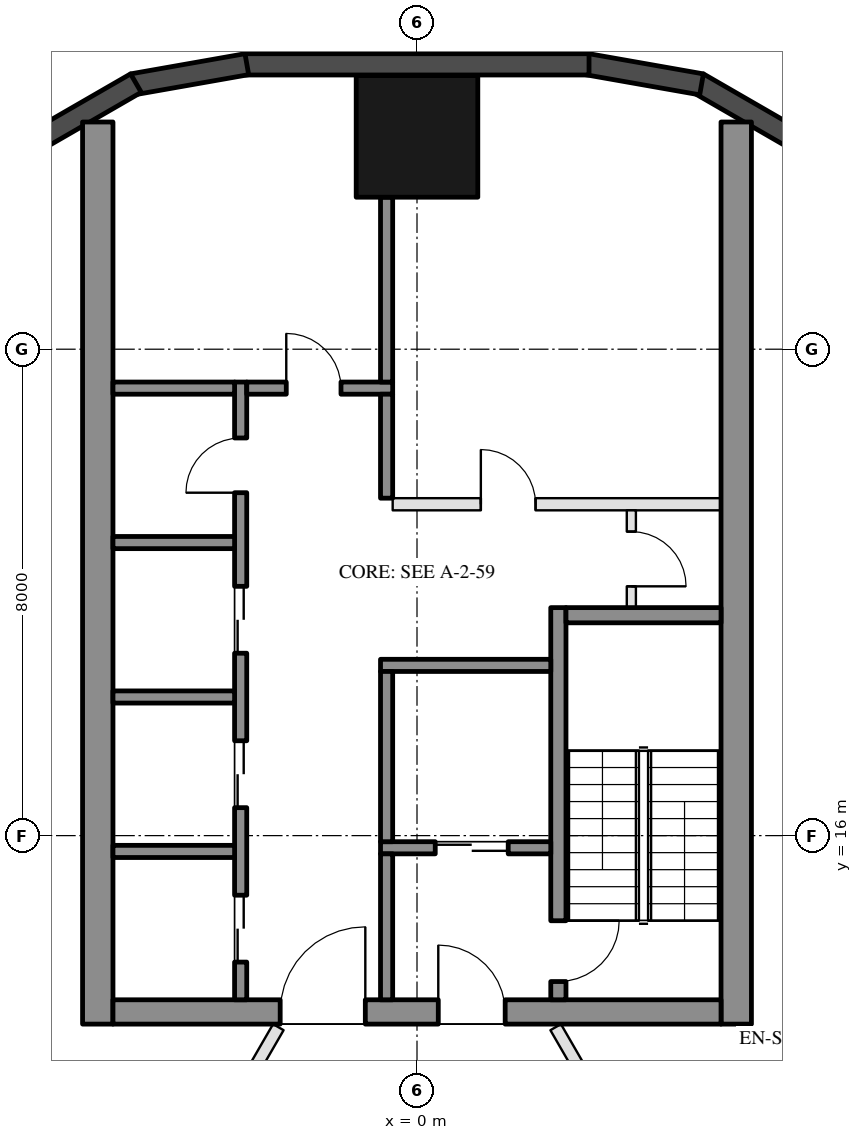
"""IFC4 building model, lengths in metres.
Left out: names, types, materials, properties, quantities, classifications, styles, units other than length and angle.
Written with IfcOpenShell. Run it as: python <this file> out.ifc"""

import sys

from ifc_helpers import new_model, si_unit, direction, frame, frame_2d, origin, origin_2d, place, context, subcontext, project, spatial, rectangle, hollow_rectangle, extrude, boolean, halfspace, element, fill, save


model = new_model("IFC4")
c1 = context("Model", 3, precision=1e-05, world=origin(), true_north=direction((0.0, 1.0)))
c2 = subcontext(c1, "Body", "Model", "MODEL_VIEW")
j1 = project(units=[si_unit("LENGTHUNIT", "METRE"), si_unit("PLANEANGLEUNIT", "RADIAN")], contexts=[c1])
p1 = place(None, origin())
s1 = spatial("IfcSite", under=j1, at=p1, CompositionType="ELEMENT")
p2 = place(p1, origin())
s2 = spatial("IfcBuilding", under=s1, at=p2, CompositionType="ELEMENT")
p3 = place(p2, frame((0.0, 0.0, 254.1)))
s3 = spatial("IfcBuildingStorey", under=s2, at=p3, CompositionType="ELEMENT", Elevation=254.1)
p4 = place(p3, frame((0.0, 27.5, 0.0), z_axis=(0.0, -0.217312342332, 0.976102118567), x_axis=(1.0, 0.0, 0.0)))
e1 = element("IfcColumn", 1, at=p4, inside=s3, PredefinedType="COLUMN", context=c2, shape_type="SweptSolid", body=[
    boolean("DIFFERENCE", boolean("DIFFERENCE", extrude(hollow_rectangle(XDim=2.0, YDim=2.0, WallThickness=0.05, at=origin_2d()), origin(), (0.0, 0.0, 1.0), 3.791), halfspace(frame((0.0, 0.0, 0.112), z_axis=(0.0, 0.0, 1.0), x_axis=(1.0, 0.0, 0.0)), True)), halfspace(frame((0.0, 0.0, 3.678), z_axis=(0.0, 0.0, 1.0), x_axis=(1.0, 0.0, 0.0)), False)),
])
for number, where, z_axis, x_axis in (
    (2, (6.277, 27.422, 0.0), (0.0, 0.0, 1.0), (-0.866, 0.5, 0.0)),
    (3, (4.68, 28.356, 0.0), (0.0, 0.0, 1.0), (-0.985, 0.174, 0.0)),
):
    element("IfcWall", number, at=place(p3, frame(where, z_axis=z_axis, x_axis=x_axis)), inside=s3, PredefinedType="SOLIDWALL", context=c2, shape_type="SweptSolid", body=[
        extrude(rectangle(XDim=1.91, YDim=0.35, at=frame_2d((0.955, 0.0))), origin(), (0.0, 0.0, 1.0), 3.55),
    ])
p5 = place(p3, frame((2.829, 28.685, 0.0), z_axis=(0.0, 0.0, 1.0), x_axis=(-1.0, 0.0, 0.0)))
e4 = element("IfcWall", 4, at=p5, inside=s3, PredefinedType="SOLIDWALL", context=c2, shape_type="SweptSolid", body=[
    extrude(rectangle(XDim=5.658, YDim=0.35, at=frame_2d((2.829, 0.0))), origin(), (0.0, 0.0, 1.0), 3.55),
])
for number, where, z_axis, x_axis in (
    (5, (-2.799, 28.688, 0.0), (0.0, 0.0, 1.0), (-0.985, -0.174, 0.0)),
    (6, (-4.623, 28.377, 0.0), (0.0, 0.0, 1.0), (-0.866, -0.5, 0.0)),
):
    element("IfcWall", number, at=place(p3, frame(where, z_axis=z_axis, x_axis=x_axis)), inside=s3, PredefinedType="SOLIDWALL", context=c2, shape_type="SweptSolid", body=[
        extrude(rectangle(XDim=1.91, YDim=0.35, at=frame_2d((0.955, 0.0))), origin(), (0.0, 0.0, 1.0), 3.55),
    ])
for number, where, z_axis, x_axis in (
    (7, (5.25, 12.9, 0.0), (0.0, 0.0, 1.0), (0.0, 1.0, 0.0)),
    (8, (-5.25, 12.9, 0.0), (0.0, 0.0, 1.0), (0.0, 1.0, 0.0)),
):
    element("IfcWall", number, at=place(p3, frame(where, z_axis=z_axis, x_axis=x_axis)), inside=s3, PredefinedType="SHEAR", context=c2, shape_type="SweptSolid", body=[
        extrude(rectangle(XDim=14.837, YDim=0.5, at=frame_2d((7.418, 0.0))), origin(), (0.0, 0.0, 1.0), 3.5),
    ])
p6 = place(p3, frame((5.0, 13.1, 0.0), z_axis=(0.0, 0.0, 1.0), x_axis=(-1.0, 0.0, 0.0)))
e9 = element("IfcWall", 9, at=p6, inside=s3, PredefinedType="SHEAR", context=c2, shape_type="SweptSolid", body=[
    extrude(rectangle(XDim=10.0, YDim=0.4, at=frame_2d((5.0, 0.0))), origin(), (0.0, 0.0, 1.0), 3.5),
])
p7 = place(p6, frame((3.55, 0.0, 0.0)))
e10 = element("IfcOpeningElement", 10, at=p7, cuts=e9, PredefinedType="OPENING", context=c2, shape_type="SweptSolid", body=[
    extrude(rectangle(XDim=1.1, YDim=2.1, at=frame_2d((0.55, 1.05))), frame((0.0, 0.21, 0.0), z_axis=(0.0, -1.0, 0.0), x_axis=(1.0, 0.0, 0.0)), (0.0, 0.0, 1.0), 0.42),
])
p8 = place(p6, frame((5.85, 0.0, 0.0)))
e11 = element("IfcOpeningElement", 11, at=p8, cuts=e9, PredefinedType="OPENING", context=c2, shape_type="SweptSolid", body=[
    extrude(rectangle(XDim=1.4, YDim=2.1, at=frame_2d((0.7, 1.05))), frame((0.0, 0.21, 0.0), z_axis=(0.0, -1.0, 0.0), x_axis=(1.0, 0.0, 0.0)), (0.0, 0.0, 1.0), 0.42),
])
p9 = place(p3, frame((2.325, 13.3, 0.0), z_axis=(0.0, 0.0, 1.0), x_axis=(0.0, 1.0, 0.0)))
e12 = element("IfcWall", 12, at=p9, inside=s3, PredefinedType="SHEAR", context=c2, shape_type="SweptSolid", body=[
    extrude(rectangle(XDim=6.45, YDim=0.25, at=frame_2d((3.225, 0.0))), origin(), (0.0, 0.0, 1.0), 3.5),
])
p10 = place(p9, frame((0.3, 0.0, 0.0)))
e13 = element("IfcOpeningElement", 13, at=p10, cuts=e12, PredefinedType="OPENING", context=c2, shape_type="SweptSolid", body=[
    extrude(rectangle(XDim=1.0, YDim=2.1, at=frame_2d((0.5, 1.05))), frame((0.0, 0.135, 0.0), z_axis=(0.0, -1.0, 0.0), x_axis=(1.0, 0.0, 0.0)), (0.0, 0.0, 1.0), 0.27),
])
p11 = place(p3, frame((5.0, 19.625, 0.0), z_axis=(0.0, 0.0, 1.0), x_axis=(-1.0, 0.0, 0.0)))
e14 = element("IfcWall", 14, at=p11, inside=s3, PredefinedType="SHEAR", context=c2, shape_type="SweptSolid", body=[
    extrude(rectangle(XDim=2.55, YDim=0.25, at=frame_2d((1.275, 0.0))), origin(), (0.0, 0.0, 1.0), 3.5),
])
p12 = place(p3, frame((2.2, 18.8, 0.0), z_axis=(0.0, 0.0, 1.0), x_axis=(-1.0, 0.0, 0.0)))
e15 = element("IfcWall", 15, at=p12, inside=s3, PredefinedType="SHEAR", context=c2, shape_type="SweptSolid", body=[
    extrude(rectangle(XDim=2.8, YDim=0.2, at=frame_2d((1.4, 0.0))), origin(), (0.0, 0.0, 1.0), 3.5),
])
p13 = place(p3, frame((2.2, 15.8, 0.0), z_axis=(0.0, 0.0, 1.0), x_axis=(-1.0, 0.0, 0.0)))
e16 = element("IfcWall", 16, at=p13, inside=s3, PredefinedType="SHEAR", context=c2, shape_type="SweptSolid", body=[
    extrude(rectangle(XDim=2.8, YDim=0.2, at=frame_2d((1.4, 0.0))), origin(), (0.0, 0.0, 1.0), 3.5),
])
p14 = place(p13, frame((0.7, 0.0, 0.0)))
e17 = element("IfcOpeningElement", 17, at=p14, cuts=e16, PredefinedType="OPENING", context=c2, shape_type="SweptSolid", body=[
    extrude(rectangle(XDim=1.2, YDim=2.1, at=frame_2d((0.6, 1.05))), frame((0.0, 0.11, 0.0), z_axis=(0.0, -1.0, 0.0), x_axis=(1.0, 0.0, 0.0)), (0.0, 0.0, 1.0), 0.22),
])
p15 = place(p3, frame((-0.5, 15.9, 0.0), z_axis=(0.0, 0.0, 1.0), x_axis=(0.0, 1.0, 0.0)))
e18 = element("IfcWall", 18, at=p15, inside=s3, PredefinedType="SHEAR", context=c2, shape_type="SweptSolid", body=[
    extrude(rectangle(XDim=2.8, YDim=0.2, at=frame_2d((1.4, 0.0))), origin(), (0.0, 0.0, 1.0), 3.5),
])
p16 = place(p3, frame((-0.5, 13.3, 0.0), z_axis=(0.0, 0.0, 1.0), x_axis=(0.0, 1.0, 0.0)))
e19 = element("IfcWall", 19, at=p16, inside=s3, PredefinedType="SHEAR", context=c2, shape_type="SweptSolid", body=[
    extrude(rectangle(XDim=2.4, YDim=0.2, at=frame_2d((1.2, 0.0))), origin(), (0.0, 0.0, 1.0), 3.5),
])
p17 = place(p3, frame((-2.9, 13.3, 0.0), z_axis=(0.0, 0.0, 1.0), x_axis=(0.0, 1.0, 0.0)))
e20 = element("IfcWall", 20, at=p17, inside=s3, PredefinedType="SHEAR", context=c2, shape_type="SweptSolid", body=[
    extrude(rectangle(XDim=10.16, YDim=0.2, at=frame_2d((5.08, 0.0))), origin(), (0.0, 0.0, 1.0), 3.5),
])
p18 = place(p17, frame((0.62, 0.0, 0.0)))
e21 = element("IfcOpeningElement", 21, at=p18, cuts=e20, PredefinedType="OPENING", context=c2, shape_type="SweptSolid", body=[
    extrude(rectangle(XDim=1.1, YDim=2.1, at=frame_2d((0.55, 1.05))), frame((0.0, 0.11, 0.0), z_axis=(0.0, -1.0, 0.0), x_axis=(1.0, 0.0, 0.0)), (0.0, 0.0, 1.0), 0.22),
])
p19 = place(p17, frame((3.16, 0.0, 0.0)))
e22 = element("IfcOpeningElement", 22, at=p19, cuts=e20, PredefinedType="OPENING", context=c2, shape_type="SweptSolid", body=[
    extrude(rectangle(XDim=1.1, YDim=2.1, at=frame_2d((0.55, 1.05))), frame((0.0, 0.11, 0.0), z_axis=(0.0, -1.0, 0.0), x_axis=(1.0, 0.0, 0.0)), (0.0, 0.0, 1.0), 0.22),
])
p20 = place(p17, frame((5.7, 0.0, 0.0)))
e23 = element("IfcOpeningElement", 23, at=p20, cuts=e20, PredefinedType="OPENING", context=c2, shape_type="SweptSolid", body=[
    extrude(rectangle(XDim=1.1, YDim=2.1, at=frame_2d((0.55, 1.05))), frame((0.0, 0.11, 0.0), z_axis=(0.0, -1.0, 0.0), x_axis=(1.0, 0.0, 0.0)), (0.0, 0.0, 1.0), 0.22),
])
p21 = place(p17, frame((8.34, 0.0, 0.0)))
e24 = element("IfcOpeningElement", 24, at=p21, cuts=e20, PredefinedType="OPENING", context=c2, shape_type="SweptSolid", body=[
    extrude(rectangle(XDim=0.9, YDim=2.1, at=frame_2d((0.45, 1.05))), frame((0.0, 0.11, 0.0), z_axis=(0.0, -1.0, 0.0), x_axis=(1.0, 0.0, 0.0)), (0.0, 0.0, 1.0), 0.22),
])
p22 = place(p3, frame((-0.4, 23.36, 0.0), z_axis=(0.0, 0.0, 1.0), x_axis=(-1.0, 0.0, 0.0)))
e25 = element("IfcWall", 25, at=p22, inside=s3, PredefinedType="SHEAR", context=c2, shape_type="SweptSolid", body=[
    extrude(rectangle(XDim=2.4, YDim=0.2, at=frame_2d((1.2, 0.0))), origin(), (0.0, 0.0, 1.0), 3.5),
])
p23 = place(p22, frame((0.85, 0.0, 0.0)))
e26 = element("IfcOpeningElement", 26, at=p23, cuts=e25, PredefinedType="OPENING", context=c2, shape_type="SweptSolid", body=[
    extrude(rectangle(XDim=0.9, YDim=2.1, at=frame_2d((0.45, 1.05))), frame((0.0, 0.11, 0.0), z_axis=(0.0, -1.0, 0.0), x_axis=(1.0, 0.0, 0.0)), (0.0, 0.0, 1.0), 0.22),
])
p24 = place(p3, frame((-0.5, 21.55, 0.0), z_axis=(0.0, 0.0, 1.0), x_axis=(0.0, 1.0, 0.0)))
e27 = element("IfcWall", 27, at=p24, inside=s3, PredefinedType="SHEAR", context=c2, shape_type="SweptSolid", body=[
    extrude(rectangle(XDim=1.71, YDim=0.2, at=frame_2d((0.855, 0.0))), origin(), (0.0, 0.0, 1.0), 3.5),
])
for number, where, z_axis, x_axis in (
    (28, (-3.0, 15.74, 0.0), (0.0, 0.0, 1.0), (-1.0, 0.0, 0.0)),
    (29, (-3.0, 18.28, 0.0), (0.0, 0.0, 1.0), (-1.0, 0.0, 0.0)),
    (30, (-3.0, 20.82, 0.0), (0.0, 0.0, 1.0), (-1.0, 0.0, 0.0)),
    (31, (-3.0, 23.36, 0.0), (0.0, 0.0, 1.0), (-1.0, 0.0, 0.0)),
):
    element("IfcWall", number, at=place(p3, frame(where, z_axis=z_axis, x_axis=x_axis)), inside=s3, PredefinedType="SHEAR", context=c2, shape_type="SweptSolid", body=[
        extrude(rectangle(XDim=2.0, YDim=0.2, at=frame_2d((1.0, 0.0))), origin(), (0.0, 0.0, 1.0), 3.5),
    ])
p25 = place(p3, frame((-0.5, 23.46, 0.0), z_axis=(0.0, 0.0, 1.0), x_axis=(0.0, 1.0, 0.0)))
e32 = element("IfcWall", 32, at=p25, inside=s3, PredefinedType="SHEAR", context=c2, shape_type="SweptSolid", body=[
    extrude(rectangle(XDim=3.04, YDim=0.2, at=frame_2d((1.52, 0.0))), origin(), (0.0, 0.0, 1.0), 3.5),
])
p26 = place(p3, frame((5.0, 21.45, 0.0), z_axis=(0.0, 0.0, 1.0), x_axis=(-1.0, 0.0, 0.0)))
e33 = element("IfcWall", 33, at=p26, inside=s3, PredefinedType="PARTITIONING", context=c2, shape_type="SweptSolid", body=[
    extrude(rectangle(XDim=5.4, YDim=0.2, at=frame_2d((2.7, 0.0))), origin(), (0.0, 0.0, 1.0), 3.5),
])
p27 = place(p26, frame((3.05, 0.0, 0.0)))
e34 = element("IfcOpeningElement", 34, at=p27, cuts=e33, PredefinedType="OPENING", context=c2, shape_type="SweptSolid", body=[
    extrude(rectangle(XDim=0.9, YDim=2.1, at=frame_2d((0.45, 1.05))), frame((0.0, 0.11, 0.0), z_axis=(0.0, -1.0, 0.0), x_axis=(1.0, 0.0, 0.0)), (0.0, 0.0, 1.0), 0.22),
])
p28 = place(p3, frame((3.525, 19.75, 0.0), z_axis=(0.0, 0.0, 1.0), x_axis=(0.0, 1.0, 0.0)))
e35 = element("IfcWall", 35, at=p28, inside=s3, PredefinedType="PARTITIONING", context=c2, shape_type="SweptSolid", body=[
    extrude(rectangle(XDim=1.6, YDim=0.15, at=frame_2d((0.8, 0.0))), origin(), (0.0, 0.0, 1.0), 3.5),
])
p29 = place(p28, frame((0.35, 0.0, 0.0)))
e36 = element("IfcOpeningElement", 36, at=p29, cuts=e35, PredefinedType="OPENING", context=c2, shape_type="SweptSolid", body=[
    extrude(rectangle(XDim=0.9, YDim=2.1, at=frame_2d((0.45, 1.05))), frame((0.0, 0.085, 0.0), z_axis=(0.0, -1.0, 0.0), x_axis=(1.0, 0.0, 0.0)), (0.0, 0.0, 1.0), 0.17),
])
p30 = place(p3, frame((14.722, 13.061, 0.0), z_axis=(0.0, 0.0, 1.0), x_axis=(-0.87738195935, -0.479792556641, 0.0)))
e37 = element("IfcWall", 37, at=p30, inside=s3, PredefinedType="PARTITIONING", context=c2, shape_type="SweptSolid", body=[
    extrude(rectangle(XDim=10.983, YDim=0.2, at=frame_2d((5.491, 0.0))), origin(), (0.0, 0.0, 1.0), 3.0),
])
p31 = place(p3, frame((-13.672, 13.08, 0.0), z_axis=(0.0, 0.0, 1.0), x_axis=(0.912311972773, -0.409495866077, 0.0)))
e38 = element("IfcWall", 38, at=p31, inside=s3, PredefinedType="PARTITIONING", context=c2, shape_type="SweptSolid", body=[
    extrude(rectangle(XDim=10.132, YDim=0.2, at=frame_2d((5.066, 0.0))), origin(), (0.0, 0.0, 1.0), 3.1),
])
p32 = place(p3, frame((2.281, 12.85, 0.0), z_axis=(0.0, 0.0, 1.0), x_axis=(0.499962807305, -0.866046875932, 0.0)))
e39 = element("IfcWall", 39, at=p32, inside=s3, PredefinedType="PARTITIONING", context=c2, shape_type="SweptSolid", body=[
    extrude(rectangle(XDim=5.686, YDim=0.2, at=frame_2d((2.843, 0.0))), origin(), (0.0, 0.0, 1.0), 3.0),
])
p33 = place(p32, frame((2.343, 0.0, 0.0)))
e40 = element("IfcOpeningElement", 40, at=p33, cuts=e39, PredefinedType="OPENING", context=c2, shape_type="SweptSolid", body=[
    extrude(rectangle(XDim=1.0, YDim=2.1, at=frame_2d((0.5, 1.05))), frame((0.0, 0.11, 0.0), z_axis=(0.0, -1.0, 0.0), x_axis=(1.0, 0.0, 0.0)), (0.0, 0.0, 1.0), 0.22),
])
p34 = place(p3, frame((-4.469, 9.059, 0.0), z_axis=(0.0, 0.0, 1.0), x_axis=(0.499996027077, 0.86602769754, 0.0)))
e41 = element("IfcWall", 41, at=p34, inside=s3, PredefinedType="PARTITIONING", context=c2, shape_type="SweptSolid", body=[
    extrude(rectangle(XDim=4.377, YDim=0.2, at=frame_2d((2.189, 0.0))), origin(), (0.0, 0.0, 1.0), 3.0),
])
p35 = place(p34, frame((1.689, 0.0, 0.0)))
e42 = element("IfcOpeningElement", 42, at=p35, cuts=e41, PredefinedType="OPENING", context=c2, shape_type="SweptSolid", body=[
    extrude(rectangle(XDim=1.0, YDim=2.1, at=frame_2d((0.5, 1.05))), frame((0.0, 0.11, 0.0), z_axis=(0.0, -1.0, 0.0), x_axis=(1.0, 0.0, 0.0)), (0.0, 0.0, 1.0), 0.22),
])
p36 = place(p14, origin())
e43 = element("IfcDoor", 43, at=p36, inside=s3, OperationType="DOUBLE_DOOR_SLIDING", PredefinedType="DOOR", context=c2, shape_type="SweptSolid", body=[
    extrude(rectangle(XDim=1.2, YDim=2.1, at=frame_2d((0.6, 1.05))), frame((0.0, 0.025, 0.0), z_axis=(0.0, -1.0, 0.0), x_axis=(1.0, 0.0, 0.0)), (0.0, 0.0, 1.0), 0.05),
])
fill(e17, e43)
p37 = place(p29, frame((0.9, 0.0, 0.0), z_axis=(0.0, 0.0, 1.0), x_axis=(-1.0, 0.0, 0.0)))
e44 = element("IfcDoor", 44, at=p37, inside=s3, OperationType="SINGLE_SWING_RIGHT", PredefinedType="DOOR", context=c2, shape_type="SweptSolid", body=[
    extrude(rectangle(XDim=0.9, YDim=2.1, at=frame_2d((0.45, 1.05))), frame((0.0, 0.025, 0.0), z_axis=(0.0, -1.0, 0.0), x_axis=(1.0, 0.0, 0.0)), (0.0, 0.0, 1.0), 0.05),
])
fill(e36, e44)
p38 = place(p18, origin())
e45 = element("IfcDoor", 45, at=p38, inside=s3, OperationType="DOUBLE_DOOR_SLIDING", PredefinedType="DOOR", context=c2, shape_type="SweptSolid", body=[
    extrude(rectangle(XDim=1.1, YDim=2.1, at=frame_2d((0.55, 1.05))), frame((0.0, 0.025, 0.0), z_axis=(0.0, -1.0, 0.0), x_axis=(1.0, 0.0, 0.0)), (0.0, 0.0, 1.0), 0.05),
])
fill(e21, e45)
p39 = place(p19, origin())
e46 = element("IfcDoor", 46, at=p39, inside=s3, OperationType="DOUBLE_DOOR_SLIDING", PredefinedType="DOOR", context=c2, shape_type="SweptSolid", body=[
    extrude(rectangle(XDim=1.1, YDim=2.1, at=frame_2d((0.55, 1.05))), frame((0.0, 0.025, 0.0), z_axis=(0.0, -1.0, 0.0), x_axis=(1.0, 0.0, 0.0)), (0.0, 0.0, 1.0), 0.05),
])
fill(e22, e46)
p40 = place(p20, origin())
e47 = element("IfcDoor", 47, at=p40, inside=s3, OperationType="DOUBLE_DOOR_SLIDING", PredefinedType="DOOR", context=c2, shape_type="SweptSolid", body=[
    extrude(rectangle(XDim=1.1, YDim=2.1, at=frame_2d((0.55, 1.05))), frame((0.0, 0.025, 0.0), z_axis=(0.0, -1.0, 0.0), x_axis=(1.0, 0.0, 0.0)), (0.0, 0.0, 1.0), 0.05),
])
fill(e23, e47)
p41 = place(p21, origin())
e48 = element("IfcDoor", 48, at=p41, inside=s3, OperationType="SINGLE_SWING_LEFT", PredefinedType="DOOR", context=c2, shape_type="SweptSolid", body=[
    extrude(rectangle(XDim=0.9, YDim=2.1, at=frame_2d((0.45, 1.05))), frame((0.0, 0.025, 0.0), z_axis=(0.0, -1.0, 0.0), x_axis=(1.0, 0.0, 0.0)), (0.0, 0.0, 1.0), 0.05),
])
fill(e24, e48)
p42 = place(p23, frame((0.9, 0.0, 0.0), z_axis=(0.0, 0.0, 1.0), x_axis=(-1.0, 0.0, 0.0)))
e49 = element("IfcDoor", 49, at=p42, inside=s3, OperationType="SINGLE_SWING_LEFT", PredefinedType="DOOR", context=c2, shape_type="SweptSolid", body=[
    extrude(rectangle(XDim=0.9, YDim=2.1, at=frame_2d((0.45, 1.05))), frame((0.0, 0.025, 0.0), z_axis=(0.0, -1.0, 0.0), x_axis=(1.0, 0.0, 0.0)), (0.0, 0.0, 1.0), 0.05),
])
fill(e26, e49)
p43 = place(p27, frame((0.9, 0.0, 0.0), z_axis=(0.0, 0.0, 1.0), x_axis=(-1.0, 0.0, 0.0)))
e50 = element("IfcDoor", 50, at=p43, inside=s3, OperationType="SINGLE_SWING_LEFT", PredefinedType="DOOR", context=c2, shape_type="SweptSolid", body=[
    extrude(rectangle(XDim=0.9, YDim=2.1, at=frame_2d((0.45, 1.05))), frame((0.0, 0.025, 0.0), z_axis=(0.0, -1.0, 0.0), x_axis=(1.0, 0.0, 0.0)), (0.0, 0.0, 1.0), 0.05),
])
fill(e34, e50)
p44 = place(p7, frame((1.1, 0.0, 0.0), z_axis=(0.0, 0.0, 1.0), x_axis=(-1.0, 0.0, 0.0)))
e51 = element("IfcDoor", 51, at=p44, inside=s3, OperationType="SINGLE_SWING_LEFT", PredefinedType="DOOR", context=c2, shape_type="SweptSolid", body=[
    extrude(rectangle(XDim=1.1, YDim=2.1, at=frame_2d((0.55, 1.05))), frame((0.0, 0.025, 0.0), z_axis=(0.0, -1.0, 0.0), x_axis=(1.0, 0.0, 0.0)), (0.0, 0.0, 1.0), 0.05),
])
fill(e10, e51)
p45 = place(p8, frame((1.4, 0.0, 0.0), z_axis=(0.0, 0.0, 1.0), x_axis=(-1.0, 0.0, 0.0)))
e52 = element("IfcDoor", 52, at=p45, inside=s3, OperationType="DOUBLE_DOOR_SINGLE_SWING", PredefinedType="DOOR", context=c2, shape_type="SweptSolid", body=[
    extrude(rectangle(XDim=1.4, YDim=2.1, at=frame_2d((0.7, 1.05))), frame((0.0, 0.025, 0.0), z_axis=(0.0, -1.0, 0.0), x_axis=(1.0, 0.0, 0.0)), (0.0, 0.0, 1.0), 0.05),
])
fill(e11, e52)
p46 = place(p10, frame((1.0, 0.0, 0.0), z_axis=(0.0, 0.0, 1.0), x_axis=(-1.0, 0.0, 0.0)))
e53 = element("IfcDoor", 53, at=p46, inside=s3, OperationType="SINGLE_SWING_LEFT", PredefinedType="DOOR", context=c2, shape_type="SweptSolid", body=[
    extrude(rectangle(XDim=1.0, YDim=2.1, at=frame_2d((0.5, 1.05))), frame((0.0, 0.025, 0.0), z_axis=(0.0, -1.0, 0.0), x_axis=(1.0, 0.0, 0.0)), (0.0, 0.0, 1.0), 0.05),
])
fill(e13, e53)
save(model, sys.argv[1])
